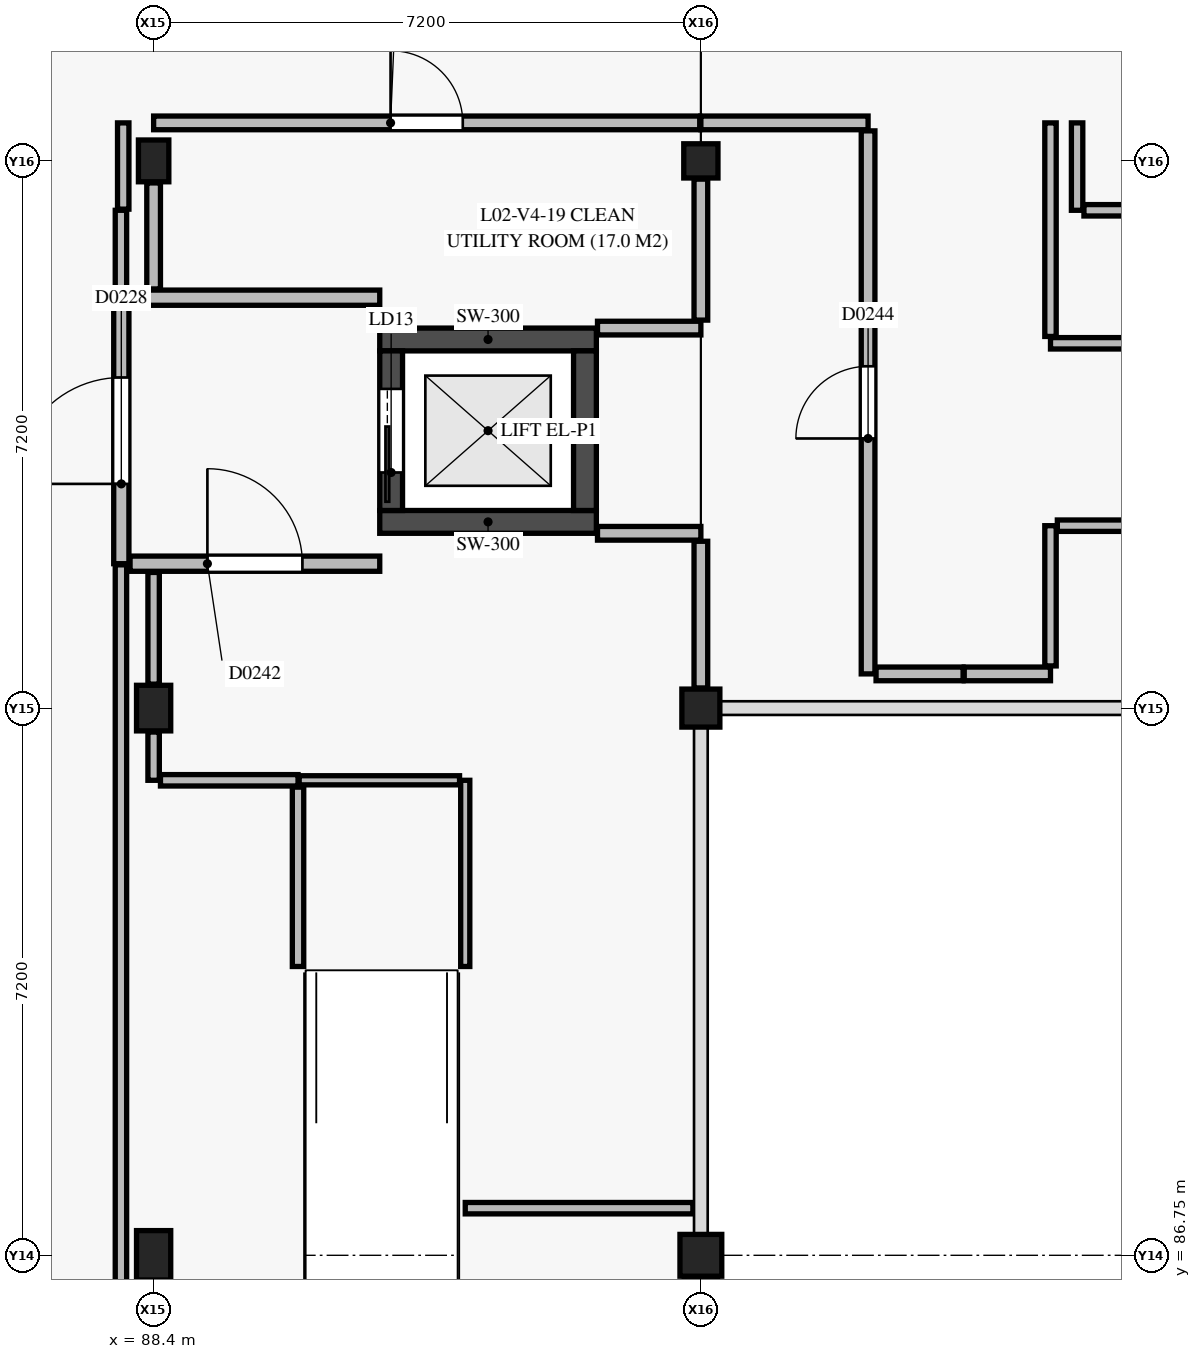
"""IFC4 building model, lengths in metres.
Left out: names, types, materials, properties, quantities, classifications, styles, units other than length and angle.
Written with IfcOpenShell. Run it as: python <this file> out.ifc"""

import sys

from ifc_helpers import new_model, si_unit, direction, frame, frame_2d, origin, origin_2d, place, context, subcontext, project, spatial, rectangle, extrude, element, fill, save


model = new_model("IFC4")
c1 = context("Model", 3, precision=1e-05, world=origin(), true_north=direction((0.0, 1.0)))
c2 = subcontext(c1, "Body", "Model", "MODEL_VIEW")
j1 = project(units=[si_unit("LENGTHUNIT", "METRE"), si_unit("PLANEANGLEUNIT", "RADIAN")], contexts=[c1])
p1 = place(None, origin())
s1 = spatial("IfcSite", under=j1, at=p1, CompositionType="ELEMENT")
p2 = place(p1, origin())
s2 = spatial("IfcBuilding", under=s1, at=p2, CompositionType="ELEMENT")
p3 = place(p2, frame((0.0, 0.0, 9.0)))
s3 = spatial("IfcBuildingStorey", under=s2, at=p3, CompositionType="ELEMENT", Elevation=9.0)
p4 = place(p3, frame((88.4, 86.75, 0.0), z_axis=(0.0, 0.0, 1.0), x_axis=(1.0, 0.0, 0.0)))
e1 = element("IfcColumn", 1, at=p4, inside=s3, PredefinedType="COLUMN", context=c2, shape_type="SweptSolid", body=[
    extrude(rectangle(XDim=0.45, YDim=0.65, at=origin_2d()), origin(), (0.0, 0.0, 1.0), 4.2),
])
p5 = place(p3, frame((88.4, 93.95, 0.0), z_axis=(0.0, 0.0, 1.0), x_axis=(1.0, 0.0, 0.0)))
e2 = element("IfcColumn", 2, at=p5, inside=s3, PredefinedType="COLUMN", context=c2, shape_type="SweptSolid", body=[
    extrude(rectangle(XDim=0.45, YDim=0.6, at=origin_2d()), origin(), (0.0, 0.0, 1.0), 4.2),
])
p6 = place(p3, frame((88.4, 101.15, 0.0), z_axis=(0.0, 0.0, 1.0), x_axis=(1.0, 0.0, 0.0)))
e3 = element("IfcColumn", 3, at=p6, inside=s3, PredefinedType="COLUMN", context=c2, shape_type="SweptSolid", body=[
    extrude(rectangle(XDim=0.4, YDim=0.55, at=origin_2d()), origin(), (0.0, 0.0, 1.0), 4.2),
])
p7 = place(p3, frame((95.6, 86.75, 0.0), z_axis=(0.0, 0.0, 1.0), x_axis=(1.0, 0.0, 0.0)))
e4 = element("IfcColumn", 4, at=p7, inside=s3, PredefinedType="COLUMN", context=c2, shape_type="SweptSolid", body=[
    extrude(rectangle(XDim=0.55, YDim=0.55, at=origin_2d()), origin(), (0.0, 0.0, 1.0), 4.2),
])
p8 = place(p3, frame((95.6, 93.95, 0.0), z_axis=(0.0, 0.0, 1.0), x_axis=(1.0, 0.0, 0.0)))
e5 = element("IfcColumn", 5, at=p8, inside=s3, PredefinedType="COLUMN", context=c2, shape_type="SweptSolid", body=[
    extrude(rectangle(XDim=0.5, YDim=0.5, at=origin_2d()), origin(), (0.0, 0.0, 1.0), 4.2),
])
p9 = place(p3, frame((95.6, 101.15, 0.0), z_axis=(0.0, 0.0, 1.0), x_axis=(1.0, 0.0, 0.0)))
e6 = element("IfcColumn", 6, at=p9, inside=s3, PredefinedType="COLUMN", context=c2, shape_type="SweptSolid", body=[
    extrude(rectangle(XDim=0.45, YDim=0.45, at=origin_2d()), origin(), (0.0, 0.0, 1.0), 4.2),
])
for number, where, z_axis, x_axis in (
    (7, (91.375, 96.4, 0.0), (0.0, 0.0, 1.0), (1.0, 0.0, 0.0)),
    (8, (91.375, 98.8, 0.0), (0.0, 0.0, 1.0), (1.0, 0.0, 0.0)),
):
    element("IfcWall", number, at=place(p3, frame(where, z_axis=z_axis, x_axis=x_axis)), inside=s3, PredefinedType="SHEAR", context=c2, shape_type="SweptSolid", body=[
        extrude(rectangle(XDim=2.85, YDim=0.3, at=frame_2d((1.425, 0.0))), origin(), (0.0, 0.0, 1.0), 3.95),
    ])
p10 = place(p3, frame((91.525, 96.55, 0.0), z_axis=(0.0, 0.0, 1.0), x_axis=(0.0, 1.0, 0.0)))
e9 = element("IfcWall", 9, at=p10, inside=s3, PredefinedType="SHEAR", context=c2, shape_type="SweptSolid", body=[
    extrude(rectangle(XDim=2.1, YDim=0.3, at=frame_2d((1.05, 0.0))), origin(), (0.0, 0.0, 1.0), 3.95),
])
p11 = place(p10, frame((0.5, 0.0, 0.0)))
e10 = element("IfcOpeningElement", 10, at=p11, cuts=e9, PredefinedType="OPENING", context=c2, shape_type="SweptSolid", body=[
    extrude(rectangle(XDim=1.1, YDim=2.15, at=frame_2d((0.55, 1.075))), frame((0.0, 0.16, 0.0), z_axis=(0.0, -1.0, 0.0), x_axis=(1.0, 0.0, 0.0)), (0.0, 0.0, 1.0), 0.32),
])
p12 = place(p3, frame((94.075, 96.55, 0.0), z_axis=(0.0, 0.0, 1.0), x_axis=(0.0, 1.0, 0.0)))
e11 = element("IfcWall", 11, at=p12, inside=s3, PredefinedType="SHEAR", context=c2, shape_type="SweptSolid", body=[
    extrude(rectangle(XDim=2.1, YDim=0.3, at=frame_2d((1.05, 0.0))), origin(), (0.0, 0.0, 1.0), 3.95),
])
p13 = place(p3, frame((95.6, 86.475, 0.0), z_axis=(0.0, 0.0, 1.0), x_axis=(0.0, -1.0, 0.0)))
e12 = element("IfcWall", 12, at=p13, inside=s3, PredefinedType="USERDEFINED", context=c2, shape_type="SweptSolid", body=[
    extrude(rectangle(XDim=6.625, YDim=0.44, at=frame_2d((3.312, 0.0))), origin(), (0.0, 0.0, 1.0), 3.13),
])
p14 = place(p13, frame((2.113, 0.0, 0.9)))
e13 = element("IfcOpeningElement", 13, at=p14, cuts=e12, PredefinedType="OPENING", context=c2, shape_type="SweptSolid", body=[
    extrude(rectangle(XDim=2.4, YDim=1.5, at=frame_2d((1.2, 0.75))), frame((0.0, 0.23, 0.0), z_axis=(0.0, -1.0, 0.0), x_axis=(1.0, 0.0, 0.0)), (0.0, 0.0, 1.0), 0.46),
])
p15 = place(p3, frame((87.975, 95.85, 0.0), z_axis=(0.0, 0.0, 1.0), x_axis=(0.0, 1.0, 0.0)))
e14 = element("IfcWall", 14, at=p15, inside=s3, PredefinedType="PARTITIONING", context=c2, shape_type="SweptSolid", body=[
    extrude(rectangle(XDim=3.5, YDim=0.2, at=frame_2d((1.75, 0.0))), origin(), (0.0, 0.0, 1.0), 3.475),
])
p16 = place(p15, frame((1.05, 0.0, 0.0)))
e15 = element("IfcOpeningElement", 15, at=p16, cuts=e14, PredefinedType="OPENING", context=c2, shape_type="SweptSolid", body=[
    extrude(rectangle(XDim=1.4, YDim=2.2, at=frame_2d((0.7, 1.1))), frame((0.0, 0.11, 0.0), z_axis=(0.0, -1.0, 0.0), x_axis=(1.0, 0.0, 0.0)), (0.0, 0.0, 1.0), 0.22),
])
p17 = place(p3, frame((88.09, 99.35, 0.0), z_axis=(0.0, 0.0, 1.0), x_axis=(1.0, 0.0, 0.0)))
e16 = element("IfcWall", 16, at=p17, inside=s3, PredefinedType="PARTITIONING", context=c2, shape_type="SweptSolid", body=[
    extrude(rectangle(XDim=3.285, YDim=0.2, at=frame_2d((1.643, 0.0))), origin(), (0.0, 0.0, 1.0), 3.385),
])
p18 = place(p3, frame((88.09, 95.85, 0.0), z_axis=(0.0, 0.0, 1.0), x_axis=(1.0, 0.0, 0.0)))
e17 = element("IfcWall", 17, at=p18, inside=s3, PredefinedType="PARTITIONING", context=c2, shape_type="SweptSolid", body=[
    extrude(rectangle(XDim=3.285, YDim=0.2, at=frame_2d((1.643, 0.0))), origin(), (0.0, 0.0, 1.0), 3.385),
])
p19 = place(p18, frame((1.018, 0.0, 0.0)))
e18 = element("IfcOpeningElement", 18, at=p19, cuts=e17, PredefinedType="OPENING", context=c2, shape_type="SweptSolid", body=[
    extrude(rectangle(XDim=1.25, YDim=2.15, at=frame_2d((0.625, 1.075))), frame((0.0, 0.11, 0.0), z_axis=(0.0, -1.0, 0.0), x_axis=(1.0, 0.0, 0.0)), (0.0, 0.0, 1.0), 0.22),
])
p20 = place(p3, frame((95.6, 101.65, 0.0), z_axis=(0.0, 0.0, 1.0), x_axis=(1.0, 0.0, 0.0)))
e19 = element("IfcWall", 19, at=p20, inside=s3, PredefinedType="PLUMBINGWALL", context=c2, shape_type="SweptSolid", body=[
    extrude(rectangle(XDim=2.2, YDim=0.18, at=frame_2d((1.1, 0.0))), origin(), (0.0, 0.0, 1.0), 3.285),
])
p21 = place(p3, frame((97.8, 94.4, 0.0), z_axis=(0.0, 0.0, 1.0), x_axis=(0.0, 1.0, 0.0)))
e20 = element("IfcWall", 20, at=p21, inside=s3, PredefinedType="PLUMBINGWALL", context=c2, shape_type="SweptSolid", body=[
    extrude(rectangle(XDim=7.145, YDim=0.18, at=frame_2d((3.573, 0.0))), origin(), (0.0, 0.0, 1.0), 3.135),
])
p22 = place(p21, frame((3.097, 0.0, 0.0)))
e21 = element("IfcOpeningElement", 21, at=p22, cuts=e20, PredefinedType="OPENING", context=c2, shape_type="SweptSolid", body=[
    extrude(rectangle(XDim=0.95, YDim=2.1, at=frame_2d((0.475, 1.05))), frame((0.0, 0.1, 0.0), z_axis=(0.0, -1.0, 0.0), x_axis=(1.0, 0.0, 0.0)), (0.0, 0.0, 1.0), 0.2),
])
p23 = place(p3, frame((97.905, 94.4, 0.0), z_axis=(0.0, 0.0, 1.0), x_axis=(1.0, 0.0, 0.0)))
e22 = element("IfcWall", 22, at=p23, inside=s3, PredefinedType="PLUMBINGWALL", context=c2, shape_type="SweptSolid", body=[
    extrude(rectangle(XDim=1.145, YDim=0.18, at=frame_2d((0.573, 0.0))), origin(), (0.0, 0.0, 1.0), 3.95),
])
p24 = place(p3, frame((99.065, 94.4, 0.0), z_axis=(0.0, 0.0, 1.0), x_axis=(1.0, 0.0, 0.0)))
e23 = element("IfcWall", 23, at=p24, inside=s3, PredefinedType="PLUMBINGWALL", context=c2, shape_type="SweptSolid", body=[
    extrude(rectangle(XDim=1.135, YDim=0.18, at=frame_2d((0.567, 0.0))), origin(), (0.0, 0.0, 1.0), 3.95),
])
p25 = place(p3, frame((88.4, 101.65, 0.0), z_axis=(0.0, 0.0, 1.0), x_axis=(1.0, 0.0, 0.0)))
e24 = element("IfcWall", 24, at=p25, inside=s3, PredefinedType="PLUMBINGWALL", context=c2, shape_type="SweptSolid", body=[
    extrude(rectangle(XDim=7.185, YDim=0.18, at=frame_2d((3.593, 0.0))), origin(), (0.0, 0.0, 1.0), 3.135),
])
p26 = place(p25, frame((3.117, 0.0, 0.0)))
e25 = element("IfcOpeningElement", 25, at=p26, cuts=e24, PredefinedType="OPENING", context=c2, shape_type="SweptSolid", body=[
    extrude(rectangle(XDim=0.95, YDim=2.1, at=frame_2d((0.475, 1.05))), frame((0.0, 0.1, 0.0), z_axis=(0.0, -1.0, 0.0), x_axis=(1.0, 0.0, 0.0)), (0.0, 0.0, 1.0), 0.2),
])
p27 = place(p3, frame((100.2, 94.505, 0.0), z_axis=(0.0, 0.0, 1.0), x_axis=(0.0, 1.0, 0.0)))
e26 = element("IfcWall", 26, at=p27, inside=s3, PredefinedType="PARTITIONING", context=c2, shape_type="SweptSolid", body=[
    extrude(rectangle(XDim=1.845, YDim=0.15, at=frame_2d((0.923, 0.0))), origin(), (0.0, 0.0, 1.0), 3.475),
])
p28 = place(p3, frame((100.29, 96.35, 0.0), z_axis=(0.0, 0.0, 1.0), x_axis=(1.0, 0.0, 0.0)))
e27 = element("IfcWall", 27, at=p28, inside=s3, PredefinedType="PARTITIONING", context=c2, shape_type="SweptSolid", body=[
    extrude(rectangle(XDim=2.51, YDim=0.15, at=frame_2d((1.255, 0.0))), origin(), (0.0, 0.0, 1.0), 3.415),
])
p29 = place(p3, frame((87.97, 74.655, 0.0), z_axis=(0.0, 0.0, 1.0), x_axis=(0.0, 1.0, 0.0)))
e28 = element("IfcWall", 28, at=p29, inside=s3, PredefinedType="PARTITIONING", context=c2, shape_type="SweptSolid", body=[
    extrude(rectangle(XDim=21.18, YDim=0.15, at=frame_2d((10.59, 0.0))), origin(), (0.0, 0.0, 1.0), 3.235),
])
p30 = place(p29, frame((6.81, 0.0, 0.0)))
e29 = element("IfcOpeningElement", 29, at=p30, cuts=e28, PredefinedType="OPENING", context=c2, shape_type="SweptSolid", body=[
    extrude(rectangle(XDim=1.15, YDim=2.15, at=frame_2d((0.575, 1.075))), frame((0.0, 0.085, 0.0), z_axis=(0.0, -1.0, 0.0), x_axis=(1.0, 0.0, 0.0)), (0.0, 0.0, 1.0), 0.17),
])
for number, where, z_axis, x_axis in (
    (30, (87.97, 99.365, 0.0), (0.0, 0.0, 1.0), (0.0, 1.0, 0.0)),
    (31, (88.0, 100.515, 0.0), (0.0, 0.0, 1.0), (0.0, 1.0, 0.0)),
):
    element("IfcWall", number, at=place(p3, frame(where, z_axis=z_axis, x_axis=x_axis)), inside=s3, PredefinedType="PARTITIONING", context=c2, shape_type="SweptSolid", body=[
        extrude(rectangle(XDim=1.135, YDim=0.15, at=frame_2d((0.567, 0.0))), origin(), (0.0, 0.0, 1.0), 3.95),
    ])
p31 = place(p3, frame((100.55, 100.5, 0.0), z_axis=(0.0, 0.0, 1.0), x_axis=(0.0, 1.0, 0.0)))
e32 = element("IfcWall", 32, at=p31, inside=s3, PredefinedType="PARTITIONING", context=c2, shape_type="SweptSolid", body=[
    extrude(rectangle(XDim=1.15, YDim=0.15, at=frame_2d((0.575, 0.0))), origin(), (0.0, 0.0, 1.0), 3.135),
])
p32 = place(p3, frame((100.64, 100.5, 0.0), z_axis=(0.0, 0.0, 1.0), x_axis=(1.0, 0.0, 0.0)))
e33 = element("IfcWall", 33, at=p32, inside=s3, PredefinedType="PARTITIONING", context=c2, shape_type="SweptSolid", body=[
    extrude(rectangle(XDim=2.16, YDim=0.15, at=frame_2d((1.08, 0.0))), origin(), (0.0, 0.0, 1.0), 3.415),
])
p33 = place(p3, frame((100.2, 98.75, 0.0), z_axis=(0.0, 0.0, 1.0), x_axis=(1.0, 0.0, 0.0)))
e34 = element("IfcWall", 34, at=p33, inside=s3, PredefinedType="PARTITIONING", context=c2, shape_type="SweptSolid", body=[
    extrude(rectangle(XDim=2.585, YDim=0.15, at=frame_2d((1.292, 0.0))), origin(), (0.0, 0.0, 1.0), 3.415),
])
p34 = place(p3, frame((100.2, 98.84, 0.0), z_axis=(0.0, 0.0, 1.0), x_axis=(0.0, 1.0, 0.0)))
e35 = element("IfcWall", 35, at=p34, inside=s3, PredefinedType="PARTITIONING", context=c2, shape_type="SweptSolid", body=[
    extrude(rectangle(XDim=2.81, YDim=0.15, at=frame_2d((1.405, 0.0))), origin(), (0.0, 0.0, 1.0), 3.135),
])
p35 = place(p3, frame((88.4, 99.465, 0.0), z_axis=(0.0, 0.0, 1.0), x_axis=(0.0, 1.0, 0.0)))
e36 = element("IfcWall", 36, at=p35, inside=s3, PredefinedType="PLUMBINGWALL", context=c2, shape_type="SweptSolid", body=[
    extrude(rectangle(XDim=1.395, YDim=0.18, at=frame_2d((0.698, 0.0))), origin(), (0.0, 0.0, 1.0), 3.385),
])
p36 = place(p3, frame((94.24, 96.25, 0.0), z_axis=(0.0, 0.0, 1.0), x_axis=(1.0, 0.0, 0.0)))
e37 = element("IfcWall", 37, at=p36, inside=s3, PredefinedType="PLUMBINGWALL", context=c2, shape_type="SweptSolid", body=[
    extrude(rectangle(XDim=1.36, YDim=0.18, at=frame_2d((0.68, 0.0))), origin(), (0.0, 0.0, 1.0), 3.285),
])
p37 = place(p3, frame((95.6, 94.215, 0.0), z_axis=(0.0, 0.0, 1.0), x_axis=(0.0, 1.0, 0.0)))
e38 = element("IfcWall", 38, at=p37, inside=s3, PredefinedType="PLUMBINGWALL", context=c2, shape_type="SweptSolid", body=[
    extrude(rectangle(XDim=1.93, YDim=0.18, at=frame_2d((0.965, 0.0))), origin(), (0.0, 0.0, 1.0), 3.285),
])
p38 = place(p3, frame((94.24, 98.95, 0.0), z_axis=(0.0, 0.0, 1.0), x_axis=(1.0, 0.0, 0.0)))
e39 = element("IfcWall", 39, at=p38, inside=s3, PredefinedType="PLUMBINGWALL", context=c2, shape_type="SweptSolid", body=[
    extrude(rectangle(XDim=1.36, YDim=0.18, at=frame_2d((0.68, 0.0))), origin(), (0.0, 0.0, 1.0), 3.285),
])
p39 = place(p3, frame((95.6, 99.055, 0.0), z_axis=(0.0, 0.0, 1.0), x_axis=(0.0, 1.0, 0.0)))
e40 = element("IfcWall", 40, at=p39, inside=s3, PredefinedType="PLUMBINGWALL", context=c2, shape_type="SweptSolid", body=[
    extrude(rectangle(XDim=1.855, YDim=0.18, at=frame_2d((0.927, 0.0))), origin(), (0.0, 0.0, 1.0), 3.285),
])
p40 = place(p3, frame((92.5, 87.37, 0.0), z_axis=(0.0, 0.0, 1.0), x_axis=(1.0, 0.0, 0.0)))
e41 = element("IfcWall", 41, at=p40, inside=s3, PredefinedType="PARTITIONING", context=c2, shape_type="SweptSolid", body=[
    extrude(rectangle(XDim=2.995, YDim=0.15, at=frame_2d((1.498, 0.0))), origin(), (0.0, 0.0, 1.0), 3.215),
])
p41 = place(p3, frame((88.4, 93.0, 0.0), z_axis=(0.0, 0.0, 1.0), x_axis=(0.0, 1.0, 0.0)))
e42 = element("IfcWall", 42, at=p41, inside=s3, PredefinedType="PARTITIONING", context=c2, shape_type="SweptSolid", body=[
    extrude(rectangle(XDim=0.635, YDim=0.15, at=frame_2d((0.317, 0.0))), origin(), (0.0, 0.0, 1.0), 3.355),
])
p42 = place(p3, frame((88.4, 94.265, 0.0), z_axis=(0.0, 0.0, 1.0), x_axis=(0.0, 1.0, 0.0)))
e43 = element("IfcWall", 43, at=p42, inside=s3, PredefinedType="PARTITIONING", context=c2, shape_type="SweptSolid", body=[
    extrude(rectangle(XDim=1.47, YDim=0.15, at=frame_2d((0.735, 0.0))), origin(), (0.0, 0.0, 1.0), 3.385),
])
p43 = place(p3, frame((88.49, 93.0, 0.0), z_axis=(0.0, 0.0, 1.0), x_axis=(1.0, 0.0, 0.0)))
e44 = element("IfcWall", 44, at=p43, inside=s3, PredefinedType="PARTITIONING", context=c2, shape_type="SweptSolid", body=[
    extrude(rectangle(XDim=1.81, YDim=0.15, at=frame_2d((0.905, 0.0))), origin(), (0.0, 0.0, 1.0), 3.355),
])
p44 = place(p3, frame((90.3, 90.55, 0.0), z_axis=(0.0, 0.0, 1.0), x_axis=(0.0, 1.0, 0.0)))
e45 = element("IfcWall", 45, at=p44, inside=s3, PredefinedType="PARTITIONING", context=c2, shape_type="SweptSolid", body=[
    extrude(rectangle(XDim=2.36, YDim=0.15, at=frame_2d((1.18, 0.0))), origin(), (0.0, 0.0, 1.0), 3.515),
])
p45 = place(p3, frame((92.5, 90.55, 0.0), z_axis=(0.0, 0.0, 1.0), x_axis=(0.0, 1.0, 0.0)))
e46 = element("IfcWall", 46, at=p45, inside=s3, PredefinedType="PARTITIONING", context=c2, shape_type="SweptSolid", body=[
    extrude(rectangle(XDim=2.45, YDim=0.12, at=frame_2d((1.225, 0.0))), origin(), (0.0, 0.0, 1.0), 3.515),
])
p46 = place(p3, frame((90.315, 93.0, 0.0), z_axis=(0.0, 0.0, 1.0), x_axis=(1.0, 0.0, 0.0)))
e47 = element("IfcWall", 47, at=p46, inside=s3, PredefinedType="PARTITIONING", context=c2, shape_type="SweptSolid", body=[
    extrude(rectangle(XDim=2.11, YDim=0.12, at=frame_2d((1.055, 0.0))), origin(), (0.0, 0.0, 1.0), 3.95),
])
p47 = place(p11, origin())
e48 = element("IfcDoor", 48, at=p47, inside=s3, OperationType="SLIDING_TO_LEFT", PredefinedType="DOOR", context=c2, shape_type="SweptSolid", body=[
    extrude(rectangle(XDim=1.1, YDim=2.15, at=frame_2d((0.55, 1.075))), frame((0.0, 0.025, 0.0), z_axis=(0.0, -1.0, 0.0), x_axis=(1.0, 0.0, 0.0)), (0.0, 0.0, 1.0), 0.05),
])
fill(e10, e48)
p48 = place(p16, origin())
e49 = element("IfcDoor", 49, at=p48, inside=s3, OperationType="SINGLE_SWING_LEFT", PredefinedType="DOOR", context=c2, shape_type="SweptSolid", body=[
    extrude(rectangle(XDim=1.4, YDim=2.2, at=frame_2d((0.7, 1.1))), frame((0.0, 0.025, 0.0), z_axis=(0.0, -1.0, 0.0), x_axis=(1.0, 0.0, 0.0)), (0.0, 0.0, 1.0), 0.05),
])
fill(e15, e49)
p49 = place(p19, origin())
e50 = element("IfcDoor", 50, at=p49, inside=s3, OperationType="SINGLE_SWING_LEFT", PredefinedType="DOOR", context=c2, shape_type="SweptSolid", body=[
    extrude(rectangle(XDim=1.25, YDim=2.15, at=frame_2d((0.625, 1.075))), frame((0.0, 0.025, 0.0), z_axis=(0.0, -1.0, 0.0), x_axis=(1.0, 0.0, 0.0)), (0.0, 0.0, 1.0), 0.05),
])
fill(e18, e50)
p50 = place(p22, origin())
e51 = element("IfcDoor", 51, at=p50, inside=s3, OperationType="SINGLE_SWING_LEFT", PredefinedType="DOOR", context=c2, shape_type="SweptSolid", body=[
    extrude(rectangle(XDim=0.95, YDim=2.1, at=frame_2d((0.475, 1.05))), frame((0.0, 0.025, 0.0), z_axis=(0.0, -1.0, 0.0), x_axis=(1.0, 0.0, 0.0)), (0.0, 0.0, 1.0), 0.05),
])
fill(e21, e51)
p51 = place(p26, origin())
e52 = element("IfcDoor", 52, at=p51, inside=s3, OperationType="SINGLE_SWING_LEFT", PredefinedType="DOOR", context=c2, shape_type="SweptSolid", body=[
    extrude(rectangle(XDim=0.95, YDim=2.1, at=frame_2d((0.475, 1.05))), frame((0.0, 0.025, 0.0), z_axis=(0.0, -1.0, 0.0), x_axis=(1.0, 0.0, 0.0)), (0.0, 0.0, 1.0), 0.05),
])
fill(e25, e52)
save(model, sys.argv[1])
